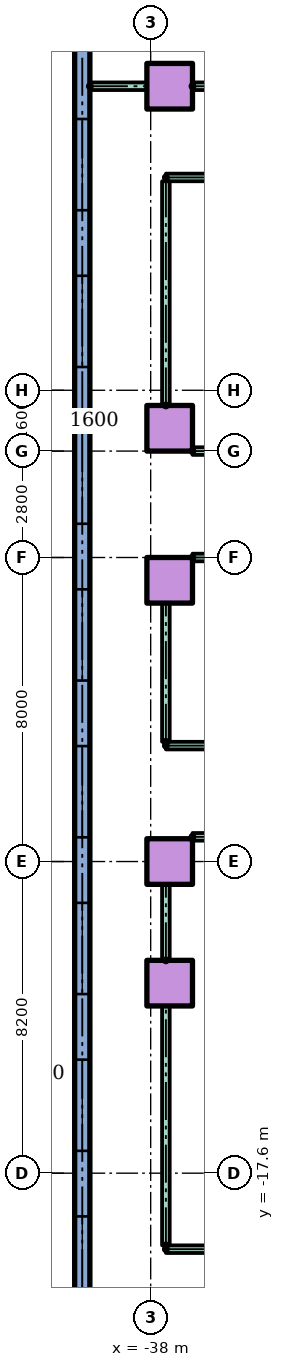
"""IFC4 building model, lengths in metres.
Left out: names, types, materials, properties, quantities, classifications, styles, units other than length and angle.
Written with IfcOpenShell. Run it as: python <this file> out.ifc"""

import sys

from ifc_helpers import new_model, si_unit, direction, frame, frame_2d, origin, origin_2d, place, context, subcontext, project, spatial, rectangle, hollow_rectangle, extrude, element, fill, save


model = new_model("IFC4")
c1 = context("Model", 3, precision=1e-05, world=origin(), true_north=direction((0.0, 1.0)))
c2 = subcontext(c1, "Body", "Model", "MODEL_VIEW")
j1 = project(units=[si_unit("LENGTHUNIT", "METRE"), si_unit("PLANEANGLEUNIT", "RADIAN")], contexts=[c1])
p1 = place(None, origin())
s1 = spatial("IfcSite", under=j1, at=p1, CompositionType="ELEMENT")
p2 = place(p1, origin())
s2 = spatial("IfcBuilding", under=s1, at=p2, CompositionType="ELEMENT")
p3 = place(p2, frame((0.0, 0.0, 18.0)))
s3 = spatial("IfcBuildingStorey", under=s2, at=p3, CompositionType="ELEMENT", Elevation=18.0)
for number, where in (
    (1, (-37.5, -12.6, 0.0)),
    (2, (-37.5, -9.4, 0.0)),
    (3, (-37.5, -2.0, 0.0)),
    (4, (-37.5, 2.0, 0.0)),
    (5, (-37.5, 11.0, 0.0)),
):
    element("IfcColumn", number, at=place(p3, frame(where)), inside=s3, PredefinedType="COLUMN", context=c2, shape_type="SweptSolid", body=[
        extrude(hollow_rectangle(XDim=1.2, YDim=1.2, WallThickness=0.06, at=origin_2d()), origin(), (0.0, 0.0, 1.0), 4.0),
    ])
p4 = place(p3, frame((-39.8, 20.0, 0.0), z_axis=(0.0, 0.0, 1.0), x_axis=(0.0, -1.0, 0.0)))
e6 = element("IfcWall", 6, at=p4, inside=s3, PredefinedType="STANDARD", context=c2, shape_type="SweptSolid", body=[
    extrude(rectangle(XDim=70.0, YDim=0.4, at=frame_2d((35.0, 0.0))), origin(), (0.0, 0.0, 1.0), 3.7),
])
p5 = place(p4, frame((1.05, 0.0, 0.9)))
e7 = element("IfcOpeningElement", 7, at=p5, cuts=e6, PredefinedType="OPENING", context=c2, shape_type="SweptSolid", body=[
    extrude(rectangle(XDim=2.4, YDim=2.1, at=frame_2d((1.2, 1.05))), frame((0.0, 0.21, 0.0), z_axis=(0.0, -1.0, 0.0), x_axis=(1.0, 0.0, 0.0)), (0.0, 0.0, 1.0), 0.42),
])
p6 = place(p4, frame((5.55, 0.0, 0.9)))
e8 = element("IfcOpeningElement", 8, at=p6, cuts=e6, PredefinedType="OPENING", context=c2, shape_type="SweptSolid", body=[
    extrude(rectangle(XDim=2.4, YDim=2.1, at=frame_2d((1.2, 1.05))), frame((0.0, 0.21, 0.0), z_axis=(0.0, -1.0, 0.0), x_axis=(1.0, 0.0, 0.0)), (0.0, 0.0, 1.0), 0.42),
])
p7 = place(p4, frame((9.863, 0.0, 0.9)))
e9 = element("IfcOpeningElement", 9, at=p7, cuts=e6, PredefinedType="OPENING", context=c2, shape_type="SweptSolid", body=[
    extrude(rectangle(XDim=2.4, YDim=2.1, at=frame_2d((1.2, 1.05))), frame((0.0, 0.21, 0.0), z_axis=(0.0, -1.0, 0.0), x_axis=(1.0, 0.0, 0.0)), (0.0, 0.0, 1.0), 0.42),
])
p8 = place(p4, frame((13.988, 0.0, 0.9)))
e10 = element("IfcOpeningElement", 10, at=p8, cuts=e6, PredefinedType="OPENING", context=c2, shape_type="SweptSolid", body=[
    extrude(rectangle(XDim=2.4, YDim=2.1, at=frame_2d((1.2, 1.05))), frame((0.0, 0.21, 0.0), z_axis=(0.0, -1.0, 0.0), x_axis=(1.0, 0.0, 0.0)), (0.0, 0.0, 1.0), 0.42),
])
p9 = place(p4, frame((18.113, 0.0, 0.9)))
e11 = element("IfcOpeningElement", 11, at=p9, cuts=e6, PredefinedType="OPENING", context=c2, shape_type="SweptSolid", body=[
    extrude(rectangle(XDim=2.4, YDim=2.1, at=frame_2d((1.2, 1.05))), frame((0.0, 0.21, 0.0), z_axis=(0.0, -1.0, 0.0), x_axis=(1.0, 0.0, 0.0)), (0.0, 0.0, 1.0), 0.42),
])
p10 = place(p4, frame((22.238, 0.0, 0.9)))
e12 = element("IfcOpeningElement", 12, at=p10, cuts=e6, PredefinedType="OPENING", context=c2, shape_type="SweptSolid", body=[
    extrude(rectangle(XDim=2.4, YDim=2.1, at=frame_2d((1.2, 1.05))), frame((0.0, 0.21, 0.0), z_axis=(0.0, -1.0, 0.0), x_axis=(1.0, 0.0, 0.0)), (0.0, 0.0, 1.0), 0.42),
])
p11 = place(p4, frame((26.363, 0.0, 0.9)))
e13 = element("IfcOpeningElement", 13, at=p11, cuts=e6, PredefinedType="OPENING", context=c2, shape_type="SweptSolid", body=[
    extrude(rectangle(XDim=2.4, YDim=2.1, at=frame_2d((1.2, 1.05))), frame((0.0, 0.21, 0.0), z_axis=(0.0, -1.0, 0.0), x_axis=(1.0, 0.0, 0.0)), (0.0, 0.0, 1.0), 0.42),
])
p12 = place(p4, frame((30.488, 0.0, 0.9)))
e14 = element("IfcOpeningElement", 14, at=p12, cuts=e6, PredefinedType="OPENING", context=c2, shape_type="SweptSolid", body=[
    extrude(rectangle(XDim=2.4, YDim=2.1, at=frame_2d((1.2, 1.05))), frame((0.0, 0.21, 0.0), z_axis=(0.0, -1.0, 0.0), x_axis=(1.0, 0.0, 0.0)), (0.0, 0.0, 1.0), 0.42),
])
p13 = place(p4, frame((34.613, 0.0, 0.9)))
e15 = element("IfcOpeningElement", 15, at=p13, cuts=e6, PredefinedType="OPENING", context=c2, shape_type="SweptSolid", body=[
    extrude(rectangle(XDim=2.4, YDim=2.1, at=frame_2d((1.2, 1.05))), frame((0.0, 0.21, 0.0), z_axis=(0.0, -1.0, 0.0), x_axis=(1.0, 0.0, 0.0)), (0.0, 0.0, 1.0), 0.42),
])
p14 = place(p4, frame((38.738, 0.0, 0.9)))
e16 = element("IfcOpeningElement", 16, at=p14, cuts=e6, PredefinedType="OPENING", context=c2, shape_type="SweptSolid", body=[
    extrude(rectangle(XDim=2.4, YDim=2.1, at=frame_2d((1.2, 1.05))), frame((0.0, 0.21, 0.0), z_axis=(0.0, -1.0, 0.0), x_axis=(1.0, 0.0, 0.0)), (0.0, 0.0, 1.0), 0.42),
])
p15 = place(p4, frame((54.05, 0.0, 0.9)))
e17 = element("IfcOpeningElement", 17, at=p15, cuts=e6, PredefinedType="OPENING", context=c2, shape_type="SweptSolid", body=[
    extrude(rectangle(XDim=2.4, YDim=2.1, at=frame_2d((1.2, 1.05))), frame((0.0, 0.21, 0.0), z_axis=(0.0, -1.0, 0.0), x_axis=(1.0, 0.0, 0.0)), (0.0, 0.0, 1.0), 0.42),
])
p16 = place(p4, frame((57.55, 0.0, 0.9)))
e18 = element("IfcOpeningElement", 18, at=p16, cuts=e6, PredefinedType="OPENING", context=c2, shape_type="SweptSolid", body=[
    extrude(rectangle(XDim=2.4, YDim=2.1, at=frame_2d((1.2, 1.05))), frame((0.0, 0.21, 0.0), z_axis=(0.0, -1.0, 0.0), x_axis=(1.0, 0.0, 0.0)), (0.0, 0.0, 1.0), 0.42),
])
p17 = place(p4, frame((61.05, 0.0, 0.9)))
e19 = element("IfcOpeningElement", 19, at=p17, cuts=e6, PredefinedType="OPENING", context=c2, shape_type="SweptSolid", body=[
    extrude(rectangle(XDim=2.4, YDim=2.1, at=frame_2d((1.2, 1.05))), frame((0.0, 0.21, 0.0), z_axis=(0.0, -1.0, 0.0), x_axis=(1.0, 0.0, 0.0)), (0.0, 0.0, 1.0), 0.42),
])
p18 = place(p4, frame((66.85, 0.0, 0.9)))
e20 = element("IfcOpeningElement", 20, at=p18, cuts=e6, PredefinedType="OPENING", context=c2, shape_type="SweptSolid", body=[
    extrude(rectangle(XDim=2.4, YDim=2.1, at=frame_2d((1.2, 1.05))), frame((0.0, 0.21, 0.0), z_axis=(0.0, -1.0, 0.0), x_axis=(1.0, 0.0, 0.0)), (0.0, 0.0, 1.0), 0.42),
])
p19 = place(p3, frame((-37.6, -19.6, 0.0)))
e21 = element("IfcWall", 21, at=p19, inside=s3, PredefinedType="PARTITIONING", context=c2, shape_type="SweptSolid", body=[
    extrude(rectangle(XDim=75.2, YDim=0.2, at=frame_2d((37.6, 0.0))), origin(), (0.0, 0.0, 1.0), 3.7),
])
p20 = place(p19, frame((2.58, 0.0, 0.0)))
e22 = element("IfcOpeningElement", 22, at=p20, cuts=e21, PredefinedType="OPENING", context=c2, shape_type="SweptSolid", body=[
    extrude(rectangle(XDim=1.0, YDim=2.1, at=frame_2d((0.5, 1.05))), frame((0.0, 0.11, 0.0), z_axis=(0.0, -1.0, 0.0), x_axis=(1.0, 0.0, 0.0)), (0.0, 0.0, 1.0), 0.22),
])
p21 = place(p19, frame((10.42, 0.0, 0.0)))
e23 = element("IfcOpeningElement", 23, at=p21, cuts=e21, PredefinedType="OPENING", context=c2, shape_type="SweptSolid", body=[
    extrude(rectangle(XDim=1.0, YDim=2.1, at=frame_2d((0.5, 1.05))), frame((0.0, 0.11, 0.0), z_axis=(0.0, -1.0, 0.0), x_axis=(1.0, 0.0, 0.0)), (0.0, 0.0, 1.0), 0.22),
])
p22 = place(p19, frame((16.58, 0.0, 0.0)))
e24 = element("IfcOpeningElement", 24, at=p22, cuts=e21, PredefinedType="OPENING", context=c2, shape_type="SweptSolid", body=[
    extrude(rectangle(XDim=1.0, YDim=2.1, at=frame_2d((0.5, 1.05))), frame((0.0, 0.11, 0.0), z_axis=(0.0, -1.0, 0.0), x_axis=(1.0, 0.0, 0.0)), (0.0, 0.0, 1.0), 0.22),
])
p23 = place(p19, frame((24.42, 0.0, 0.0)))
e25 = element("IfcOpeningElement", 25, at=p23, cuts=e21, PredefinedType="OPENING", context=c2, shape_type="SweptSolid", body=[
    extrude(rectangle(XDim=1.0, YDim=2.1, at=frame_2d((0.5, 1.05))), frame((0.0, 0.11, 0.0), z_axis=(0.0, -1.0, 0.0), x_axis=(1.0, 0.0, 0.0)), (0.0, 0.0, 1.0), 0.22),
])
p24 = place(p19, frame((33.0, 0.0, 0.0)))
e26 = element("IfcOpeningElement", 26, at=p24, cuts=e21, PredefinedType="OPENING", context=c2, shape_type="SweptSolid", body=[
    extrude(rectangle(XDim=1.0, YDim=2.1, at=frame_2d((0.5, 1.05))), frame((0.0, 0.11, 0.0), z_axis=(0.0, -1.0, 0.0), x_axis=(1.0, 0.0, 0.0)), (0.0, 0.0, 1.0), 0.22),
])
p25 = place(p19, frame((44.0, 0.0, 0.0)))
e27 = element("IfcOpeningElement", 27, at=p25, cuts=e21, PredefinedType="OPENING", context=c2, shape_type="SweptSolid", body=[
    extrude(rectangle(XDim=1.0, YDim=2.1, at=frame_2d((0.5, 1.05))), frame((0.0, 0.11, 0.0), z_axis=(0.0, -1.0, 0.0), x_axis=(1.0, 0.0, 0.0)), (0.0, 0.0, 1.0), 0.22),
])
p26 = place(p19, frame((55.8, 0.0, 0.0)))
e28 = element("IfcOpeningElement", 28, at=p26, cuts=e21, PredefinedType="OPENING", context=c2, shape_type="SweptSolid", body=[
    extrude(rectangle(XDim=1.0, YDim=2.1, at=frame_2d((0.5, 1.05))), frame((0.0, 0.11, 0.0), z_axis=(0.0, -1.0, 0.0), x_axis=(1.0, 0.0, 0.0)), (0.0, 0.0, 1.0), 0.22),
])
p27 = place(p19, frame((68.45, 0.0, 0.0)))
e29 = element("IfcOpeningElement", 29, at=p27, cuts=e21, PredefinedType="OPENING", context=c2, shape_type="SweptSolid", body=[
    extrude(rectangle(XDim=0.9, YDim=2.1, at=frame_2d((0.45, 1.05))), frame((0.0, 0.11, 0.0), z_axis=(0.0, -1.0, 0.0), x_axis=(1.0, 0.0, 0.0)), (0.0, 0.0, 1.0), 0.22),
])
p28 = place(p3, frame((-36.9, -8.75, 0.0)))
e30 = element("IfcWall", 30, at=p28, inside=s3, PredefinedType="PARTITIONING", context=c2, shape_type="SweptSolid", body=[
    extrude(rectangle(XDim=73.8, YDim=0.2, at=frame_2d((36.9, 0.0))), origin(), (0.0, 0.0, 1.0), 3.7),
])
p29 = place(p3, frame((-37.6, -6.35, 0.0)))
e31 = element("IfcWall", 31, at=p29, inside=s3, PredefinedType="PARTITIONING", context=c2, shape_type="SweptSolid", body=[
    extrude(rectangle(XDim=75.2, YDim=0.2, at=frame_2d((37.6, 0.0))), origin(), (0.0, 0.0, 1.0), 3.7),
])
p30 = place(p29, frame((7.5, 0.0, 0.0)))
e32 = element("IfcOpeningElement", 32, at=p30, cuts=e31, PredefinedType="OPENING", context=c2, shape_type="SweptSolid", body=[
    extrude(rectangle(XDim=1.0, YDim=2.1, at=frame_2d((0.5, 1.05))), frame((0.0, 0.11, 0.0), z_axis=(0.0, -1.0, 0.0), x_axis=(1.0, 0.0, 0.0)), (0.0, 0.0, 1.0), 0.22),
])
p31 = place(p29, frame((20.55, 0.0, 0.0)))
e33 = element("IfcOpeningElement", 33, at=p31, cuts=e31, PredefinedType="OPENING", context=c2, shape_type="SweptSolid", body=[
    extrude(rectangle(XDim=0.9, YDim=2.1, at=frame_2d((0.45, 1.05))), frame((0.0, 0.11, 0.0), z_axis=(0.0, -1.0, 0.0), x_axis=(1.0, 0.0, 0.0)), (0.0, 0.0, 1.0), 0.22),
])
p32 = place(p29, frame((30.55, 0.0, 0.0)))
e34 = element("IfcOpeningElement", 34, at=p32, cuts=e31, PredefinedType="OPENING", context=c2, shape_type="SweptSolid", body=[
    extrude(rectangle(XDim=0.9, YDim=2.1, at=frame_2d((0.45, 1.05))), frame((0.0, 0.11, 0.0), z_axis=(0.0, -1.0, 0.0), x_axis=(1.0, 0.0, 0.0)), (0.0, 0.0, 1.0), 0.22),
])
p33 = place(p29, frame((41.5, 0.0, 0.0)))
e35 = element("IfcOpeningElement", 35, at=p33, cuts=e31, PredefinedType="OPENING", context=c2, shape_type="SweptSolid", body=[
    extrude(rectangle(XDim=1.0, YDim=2.1, at=frame_2d((0.5, 1.05))), frame((0.0, 0.11, 0.0), z_axis=(0.0, -1.0, 0.0), x_axis=(1.0, 0.0, 0.0)), (0.0, 0.0, 1.0), 0.22),
])
p34 = place(p29, frame((61.1, 0.0, 0.0)))
e36 = element("IfcOpeningElement", 36, at=p34, cuts=e31, PredefinedType="OPENING", context=c2, shape_type="SweptSolid", body=[
    extrude(rectangle(XDim=1.0, YDim=2.1, at=frame_2d((0.5, 1.05))), frame((0.0, 0.11, 0.0), z_axis=(0.0, -1.0, 0.0), x_axis=(1.0, 0.0, 0.0)), (0.0, 0.0, 1.0), 0.22),
])
p35 = place(p3, frame((-36.9, -1.4, 0.0)))
e37 = element("IfcWall", 37, at=p35, inside=s3, PredefinedType="PARTITIONING", context=c2, shape_type="SweptSolid", body=[
    extrude(rectangle(XDim=22.9, YDim=0.2, at=frame_2d((11.45, 0.0))), origin(), (0.0, 0.0, 1.0), 3.7),
])
p36 = place(p3, frame((-36.9, 1.4, 0.0)))
e38 = element("IfcWall", 38, at=p36, inside=s3, PredefinedType="PARTITIONING", context=c2, shape_type="SweptSolid", body=[
    extrude(rectangle(XDim=20.6, YDim=0.2, at=frame_2d((10.3, 0.0))), origin(), (0.0, 0.0, 1.0), 3.7),
])
p37 = place(p36, frame((1.3, 0.0, 0.0)))
e39 = element("IfcOpeningElement", 39, at=p37, cuts=e38, PredefinedType="OPENING", context=c2, shape_type="SweptSolid", body=[
    extrude(rectangle(XDim=1.0, YDim=2.1, at=frame_2d((0.5, 1.05))), frame((0.0, 0.11, 0.0), z_axis=(0.0, -1.0, 0.0), x_axis=(1.0, 0.0, 0.0)), (0.0, 0.0, 1.0), 0.22),
])
p38 = place(p36, frame((5.25, 0.0, 0.0)))
e40 = element("IfcOpeningElement", 40, at=p38, cuts=e38, PredefinedType="OPENING", context=c2, shape_type="SweptSolid", body=[
    extrude(rectangle(XDim=1.0, YDim=2.1, at=frame_2d((0.5, 1.05))), frame((0.0, 0.11, 0.0), z_axis=(0.0, -1.0, 0.0), x_axis=(1.0, 0.0, 0.0)), (0.0, 0.0, 1.0), 0.22),
])
p39 = place(p36, frame((10.0, 0.0, 0.0)))
e41 = element("IfcOpeningElement", 41, at=p39, cuts=e38, PredefinedType="OPENING", context=c2, shape_type="SweptSolid", body=[
    extrude(rectangle(XDim=1.0, YDim=2.1, at=frame_2d((0.5, 1.05))), frame((0.0, 0.11, 0.0), z_axis=(0.0, -1.0, 0.0), x_axis=(1.0, 0.0, 0.0)), (0.0, 0.0, 1.0), 0.22),
])
p40 = place(p36, frame((12.35, 0.0, 0.0)))
e42 = element("IfcOpeningElement", 42, at=p40, cuts=e38, PredefinedType="OPENING", context=c2, shape_type="SweptSolid", body=[
    extrude(rectangle(XDim=0.9, YDim=2.1, at=frame_2d((0.45, 1.05))), frame((0.0, 0.11, 0.0), z_axis=(0.0, -1.0, 0.0), x_axis=(1.0, 0.0, 0.0)), (0.0, 0.0, 1.0), 0.22),
])
p41 = place(p3, frame((-37.6, 8.6, 0.0)))
e43 = element("IfcWall", 43, at=p41, inside=s3, PredefinedType="PARTITIONING", context=c2, shape_type="SweptSolid", body=[
    extrude(rectangle(XDim=21.3, YDim=0.2, at=frame_2d((10.65, 0.0))), origin(), (0.0, 0.0, 1.0), 3.7),
])
p42 = place(p3, frame((-39.6, 11.0, 0.0)))
e44 = element("IfcWall", 44, at=p42, inside=s3, PredefinedType="PARTITIONING", context=c2, shape_type="SweptSolid", body=[
    extrude(rectangle(XDim=1.5, YDim=0.2, at=frame_2d((0.75, 0.0))), origin(), (0.0, 0.0, 1.0), 3.7),
])
p43 = place(p3, frame((-36.9, 11.0, 0.0)))
e45 = element("IfcWall", 45, at=p43, inside=s3, PredefinedType="PARTITIONING", context=c2, shape_type="SweptSolid", body=[
    extrude(rectangle(XDim=6.4, YDim=0.2, at=frame_2d((3.2, 0.0))), origin(), (0.0, 0.0, 1.0), 3.7),
])
p44 = place(p43, frame((0.912, 0.0, 0.0)))
e46 = element("IfcOpeningElement", 46, at=p44, cuts=e45, PredefinedType="OPENING", context=c2, shape_type="SweptSolid", body=[
    extrude(rectangle(XDim=1.0, YDim=2.1, at=frame_2d((0.5, 1.05))), frame((0.0, 0.11, 0.0), z_axis=(0.0, -1.0, 0.0), x_axis=(1.0, 0.0, 0.0)), (0.0, 0.0, 1.0), 0.22),
])
p45 = place(p43, frame((5.05, 0.0, 0.0)))
e47 = element("IfcOpeningElement", 47, at=p45, cuts=e45, PredefinedType="OPENING", context=c2, shape_type="SweptSolid", body=[
    extrude(rectangle(XDim=1.0, YDim=2.1, at=frame_2d((0.5, 1.05))), frame((0.0, 0.11, 0.0), z_axis=(0.0, -1.0, 0.0), x_axis=(1.0, 0.0, 0.0)), (0.0, 0.0, 1.0), 0.22),
])
p46 = place(p3, frame((-37.6, -19.5, 0.0), z_axis=(0.0, 0.0, 1.0), x_axis=(0.0, 1.0, 0.0)))
e48 = element("IfcWall", 48, at=p46, inside=s3, PredefinedType="PARTITIONING", context=c2, shape_type="SweptSolid", body=[
    extrude(rectangle(XDim=6.3, YDim=0.2, at=frame_2d((3.15, 0.0))), origin(), (0.0, 0.0, 1.0), 3.7),
])
p47 = place(p3, frame((-37.6, -12.0, 0.0), z_axis=(0.0, 0.0, 1.0), x_axis=(0.0, 1.0, 0.0)))
e49 = element("IfcWall", 49, at=p47, inside=s3, PredefinedType="PARTITIONING", context=c2, shape_type="SweptSolid", body=[
    extrude(rectangle(XDim=2.0, YDim=0.2, at=frame_2d((1.0, 0.0))), origin(), (0.0, 0.0, 1.0), 3.7),
])
p48 = place(p3, frame((-37.6, -6.25, 0.0), z_axis=(0.0, 0.0, 1.0), x_axis=(0.0, 1.0, 0.0)))
e50 = element("IfcWall", 50, at=p48, inside=s3, PredefinedType="PARTITIONING", context=c2, shape_type="SweptSolid", body=[
    extrude(rectangle(XDim=3.65, YDim=0.2, at=frame_2d((1.825, 0.0))), origin(), (0.0, 0.0, 1.0), 3.7),
])
p49 = place(p3, frame((-37.6, 2.6, 0.0), z_axis=(0.0, 0.0, 1.0), x_axis=(0.0, 1.0, 0.0)))
e51 = element("IfcWall", 51, at=p49, inside=s3, PredefinedType="PARTITIONING", context=c2, shape_type="SweptSolid", body=[
    extrude(rectangle(XDim=5.9, YDim=0.2, at=frame_2d((2.95, 0.0))), origin(), (0.0, 0.0, 1.0), 3.7),
])
p50 = place(p7, origin())
e52 = element("IfcWindow", 52, at=p50, inside=s3, PartitioningType="SINGLE_PANEL", PredefinedType="WINDOW", context=c2, shape_type="SweptSolid", body=[
    extrude(rectangle(XDim=2.4, YDim=2.1, at=frame_2d((1.2, 1.05))), frame((0.0, 0.03, 0.0), z_axis=(0.0, -1.0, 0.0), x_axis=(1.0, 0.0, 0.0)), (0.0, 0.0, 1.0), 0.06),
])
fill(e9, e52)
p51 = place(p8, origin())
e53 = element("IfcWindow", 53, at=p51, inside=s3, PartitioningType="SINGLE_PANEL", PredefinedType="WINDOW", context=c2, shape_type="SweptSolid", body=[
    extrude(rectangle(XDim=2.4, YDim=2.1, at=frame_2d((1.2, 1.05))), frame((0.0, 0.03, 0.0), z_axis=(0.0, -1.0, 0.0), x_axis=(1.0, 0.0, 0.0)), (0.0, 0.0, 1.0), 0.06),
])
fill(e10, e53)
p52 = place(p9, origin())
e54 = element("IfcWindow", 54, at=p52, inside=s3, PartitioningType="SINGLE_PANEL", PredefinedType="WINDOW", context=c2, shape_type="SweptSolid", body=[
    extrude(rectangle(XDim=2.4, YDim=2.1, at=frame_2d((1.2, 1.05))), frame((0.0, 0.03, 0.0), z_axis=(0.0, -1.0, 0.0), x_axis=(1.0, 0.0, 0.0)), (0.0, 0.0, 1.0), 0.06),
])
fill(e11, e54)
p53 = place(p10, origin())
e55 = element("IfcWindow", 55, at=p53, inside=s3, PartitioningType="SINGLE_PANEL", PredefinedType="WINDOW", context=c2, shape_type="SweptSolid", body=[
    extrude(rectangle(XDim=2.4, YDim=2.1, at=frame_2d((1.2, 1.05))), frame((0.0, 0.03, 0.0), z_axis=(0.0, -1.0, 0.0), x_axis=(1.0, 0.0, 0.0)), (0.0, 0.0, 1.0), 0.06),
])
fill(e12, e55)
p54 = place(p11, origin())
e56 = element("IfcWindow", 56, at=p54, inside=s3, PartitioningType="SINGLE_PANEL", PredefinedType="WINDOW", context=c2, shape_type="SweptSolid", body=[
    extrude(rectangle(XDim=2.4, YDim=2.1, at=frame_2d((1.2, 1.05))), frame((0.0, 0.03, 0.0), z_axis=(0.0, -1.0, 0.0), x_axis=(1.0, 0.0, 0.0)), (0.0, 0.0, 1.0), 0.06),
])
fill(e13, e56)
p55 = place(p12, origin())
e57 = element("IfcWindow", 57, at=p55, inside=s3, PartitioningType="SINGLE_PANEL", PredefinedType="WINDOW", context=c2, shape_type="SweptSolid", body=[
    extrude(rectangle(XDim=2.4, YDim=2.1, at=frame_2d((1.2, 1.05))), frame((0.0, 0.03, 0.0), z_axis=(0.0, -1.0, 0.0), x_axis=(1.0, 0.0, 0.0)), (0.0, 0.0, 1.0), 0.06),
])
fill(e14, e57)
p56 = place(p13, origin())
e58 = element("IfcWindow", 58, at=p56, inside=s3, PartitioningType="SINGLE_PANEL", PredefinedType="WINDOW", context=c2, shape_type="SweptSolid", body=[
    extrude(rectangle(XDim=2.4, YDim=2.1, at=frame_2d((1.2, 1.05))), frame((0.0, 0.03, 0.0), z_axis=(0.0, -1.0, 0.0), x_axis=(1.0, 0.0, 0.0)), (0.0, 0.0, 1.0), 0.06),
])
fill(e15, e58)
p57 = place(p14, origin())
e59 = element("IfcWindow", 59, at=p57, inside=s3, PartitioningType="SINGLE_PANEL", PredefinedType="WINDOW", context=c2, shape_type="SweptSolid", body=[
    extrude(rectangle(XDim=2.4, YDim=2.1, at=frame_2d((1.2, 1.05))), frame((0.0, 0.03, 0.0), z_axis=(0.0, -1.0, 0.0), x_axis=(1.0, 0.0, 0.0)), (0.0, 0.0, 1.0), 0.06),
])
fill(e16, e59)
save(model, sys.argv[1])
